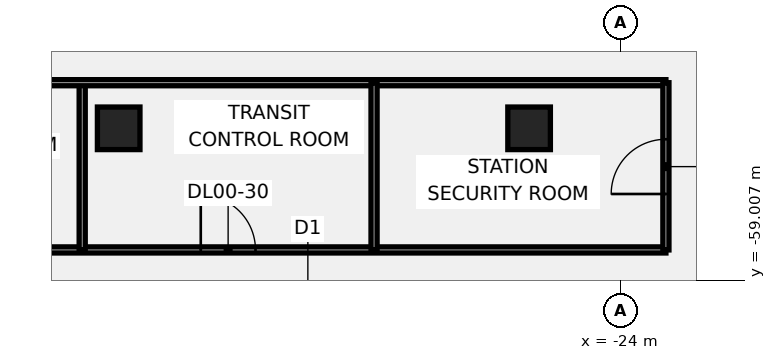
"""IFC4 building model, lengths in metres.
Left out: names, types, materials, properties, quantities, classifications, styles, units other than length and angle.
Written with IfcOpenShell. Run it as: python <this file> out.ifc"""

import sys

from ifc_helpers import new_model, si_unit, direction, frame, frame_2d, origin, origin_2d, place, context, subcontext, project, spatial, rectangle, extrude, element, fill, save


model = new_model("IFC4")
c1 = context("Model", 3, precision=1e-05, world=origin(), true_north=direction((0.0, 1.0)))
c2 = subcontext(c1, "Body", "Model", "MODEL_VIEW")
j1 = project(units=[si_unit("LENGTHUNIT", "METRE"), si_unit("PLANEANGLEUNIT", "RADIAN")], contexts=[c1])
p1 = place(None, origin())
s1 = spatial("IfcSite", under=j1, at=p1, CompositionType="ELEMENT")
p2 = place(p1, origin())
s2 = spatial("IfcBuilding", under=s1, at=p2, CompositionType="ELEMENT")
p3 = place(p2, origin())
s3 = spatial("IfcBuildingStorey", under=s2, at=p3, CompositionType="ELEMENT", Elevation=0.0)
for number, where, z_axis, x_axis in (
    (1, (-40.5, -54.0, -0.55), (0.0, 0.0, 1.0), (1.0, 0.0, 0.0)),
    (2, (-27.0, -54.0, -0.55), (0.0, 0.0, 1.0), (1.0, 0.0, 0.0)),
):
    element("IfcColumn", number, at=place(p3, frame(where, z_axis=z_axis, x_axis=x_axis)), inside=s3, PredefinedType="COLUMN", context=c2, shape_type="SweptSolid", body=[
        extrude(rectangle(XDim=1.4, YDim=1.4, at=origin_2d()), origin(), (0.0, 0.0, 1.0), 9.05),
    ])
p4 = place(p3, frame((-51.3, -58.0, 0.0), z_axis=(0.0, 0.0, 1.0), x_axis=(1.0, 0.0, 0.0)))
e3 = element("IfcWall", 3, at=p4, inside=s3, PredefinedType="PARTITIONING", context=c2, shape_type="SweptSolid", body=[
    extrude(rectangle(XDim=28.8, YDim=0.2, at=frame_2d((14.4, 0.0))), origin(), (0.0, 0.0, 1.0), 8.5),
])
p5 = place(p4, frame((13.5, 0.0, 0.0)))
e4 = element("IfcOpeningElement", 4, at=p5, cuts=e3, PredefinedType="OPENING", context=c2, shape_type="SweptSolid", body=[
    extrude(rectangle(XDim=1.8, YDim=2.1, at=frame_2d((0.9, 1.05))), frame((0.0, 0.11, 0.0), z_axis=(0.0, -1.0, 0.0), x_axis=(1.0, 0.0, 0.0)), (0.0, 0.0, 1.0), 0.22),
])
p6 = place(p4, frame((1.16, 0.0, 0.0)))
e5 = element("IfcOpeningElement", 5, at=p6, cuts=e3, PredefinedType="OPENING", context=c2, shape_type="SweptSolid", body=[
    extrude(rectangle(XDim=1.8, YDim=2.1, at=frame_2d((0.9, 1.05))), frame((0.0, 0.11, 0.0), z_axis=(0.0, -1.0, 0.0), x_axis=(1.0, 0.0, 0.0)), (0.0, 0.0, 1.0), 0.22),
])
p7 = place(p3, frame((-41.7, -58.0, 0.0), z_axis=(0.0, 0.0, 1.0), x_axis=(0.0, 1.0, 0.0)))
e6 = element("IfcWall", 6, at=p7, inside=s3, PredefinedType="PARTITIONING", context=c2, shape_type="SweptSolid", body=[
    extrude(rectangle(XDim=5.5, YDim=0.2, at=frame_2d((2.75, 0.0))), origin(), (0.0, 0.0, 1.0), 8.5),
])
p8 = place(p3, frame((-51.3, -52.5, 0.0), z_axis=(0.0, 0.0, 1.0), x_axis=(1.0, 0.0, 0.0)))
e7 = element("IfcWall", 7, at=p8, inside=s3, PredefinedType="PARTITIONING", context=c2, shape_type="SweptSolid", body=[
    extrude(rectangle(XDim=28.8, YDim=0.2, at=frame_2d((14.4, 0.0))), origin(), (0.0, 0.0, 1.0), 8.5),
])
p9 = place(p3, frame((-22.5, -58.0, 0.0), z_axis=(0.0, 0.0, 1.0), x_axis=(0.0, 1.0, 0.0)))
e8 = element("IfcWall", 8, at=p9, inside=s3, PredefinedType="PARTITIONING", context=c2, shape_type="SweptSolid", body=[
    extrude(rectangle(XDim=5.5, YDim=0.2, at=frame_2d((2.75, 0.0))), origin(), (0.0, 0.0, 1.0), 8.5),
])
p10 = place(p9, frame((1.84, 0.0, 0.0)))
e9 = element("IfcOpeningElement", 9, at=p10, cuts=e8, PredefinedType="OPENING", context=c2, shape_type="SweptSolid", body=[
    extrude(rectangle(XDim=1.8, YDim=2.1, at=frame_2d((0.9, 1.05))), frame((0.0, 0.11, 0.0), z_axis=(0.0, -1.0, 0.0), x_axis=(1.0, 0.0, 0.0)), (0.0, 0.0, 1.0), 0.22),
])
p11 = place(p3, frame((-32.1, -58.0, 0.0), z_axis=(0.0, 0.0, 1.0), x_axis=(0.0, 1.0, 0.0)))
e10 = element("IfcWall", 10, at=p11, inside=s3, PredefinedType="PARTITIONING", context=c2, shape_type="SweptSolid", body=[
    extrude(rectangle(XDim=5.5, YDim=0.2, at=frame_2d((2.75, 0.0))), origin(), (0.0, 0.0, 1.0), 8.5),
])
p12 = place(p10, origin())
e11 = element("IfcDoor", 11, at=p12, inside=s3, OperationType="SINGLE_SWING_LEFT", PredefinedType="DOOR", context=c2, shape_type="SweptSolid", body=[
    extrude(rectangle(XDim=1.8, YDim=2.1, at=frame_2d((0.9, 1.05))), frame((0.0, 0.025, 0.0), z_axis=(0.0, -1.0, 0.0), x_axis=(1.0, 0.0, 0.0)), (0.0, 0.0, 1.0), 0.05),
])
fill(e9, e11)
p13 = place(p5, origin())
e12 = element("IfcDoor", 12, at=p13, inside=s3, OperationType="SINGLE_SWING_RIGHT", PredefinedType="DOOR", context=c2, shape_type="SweptSolid", body=[
    extrude(rectangle(XDim=1.8, YDim=2.1, at=frame_2d((0.9, 1.05))), frame((0.0, 0.025, 0.0), z_axis=(0.0, -1.0, 0.0), x_axis=(1.0, 0.0, 0.0)), (0.0, 0.0, 1.0), 0.05),
])
fill(e4, e12)
save(model, sys.argv[1])
